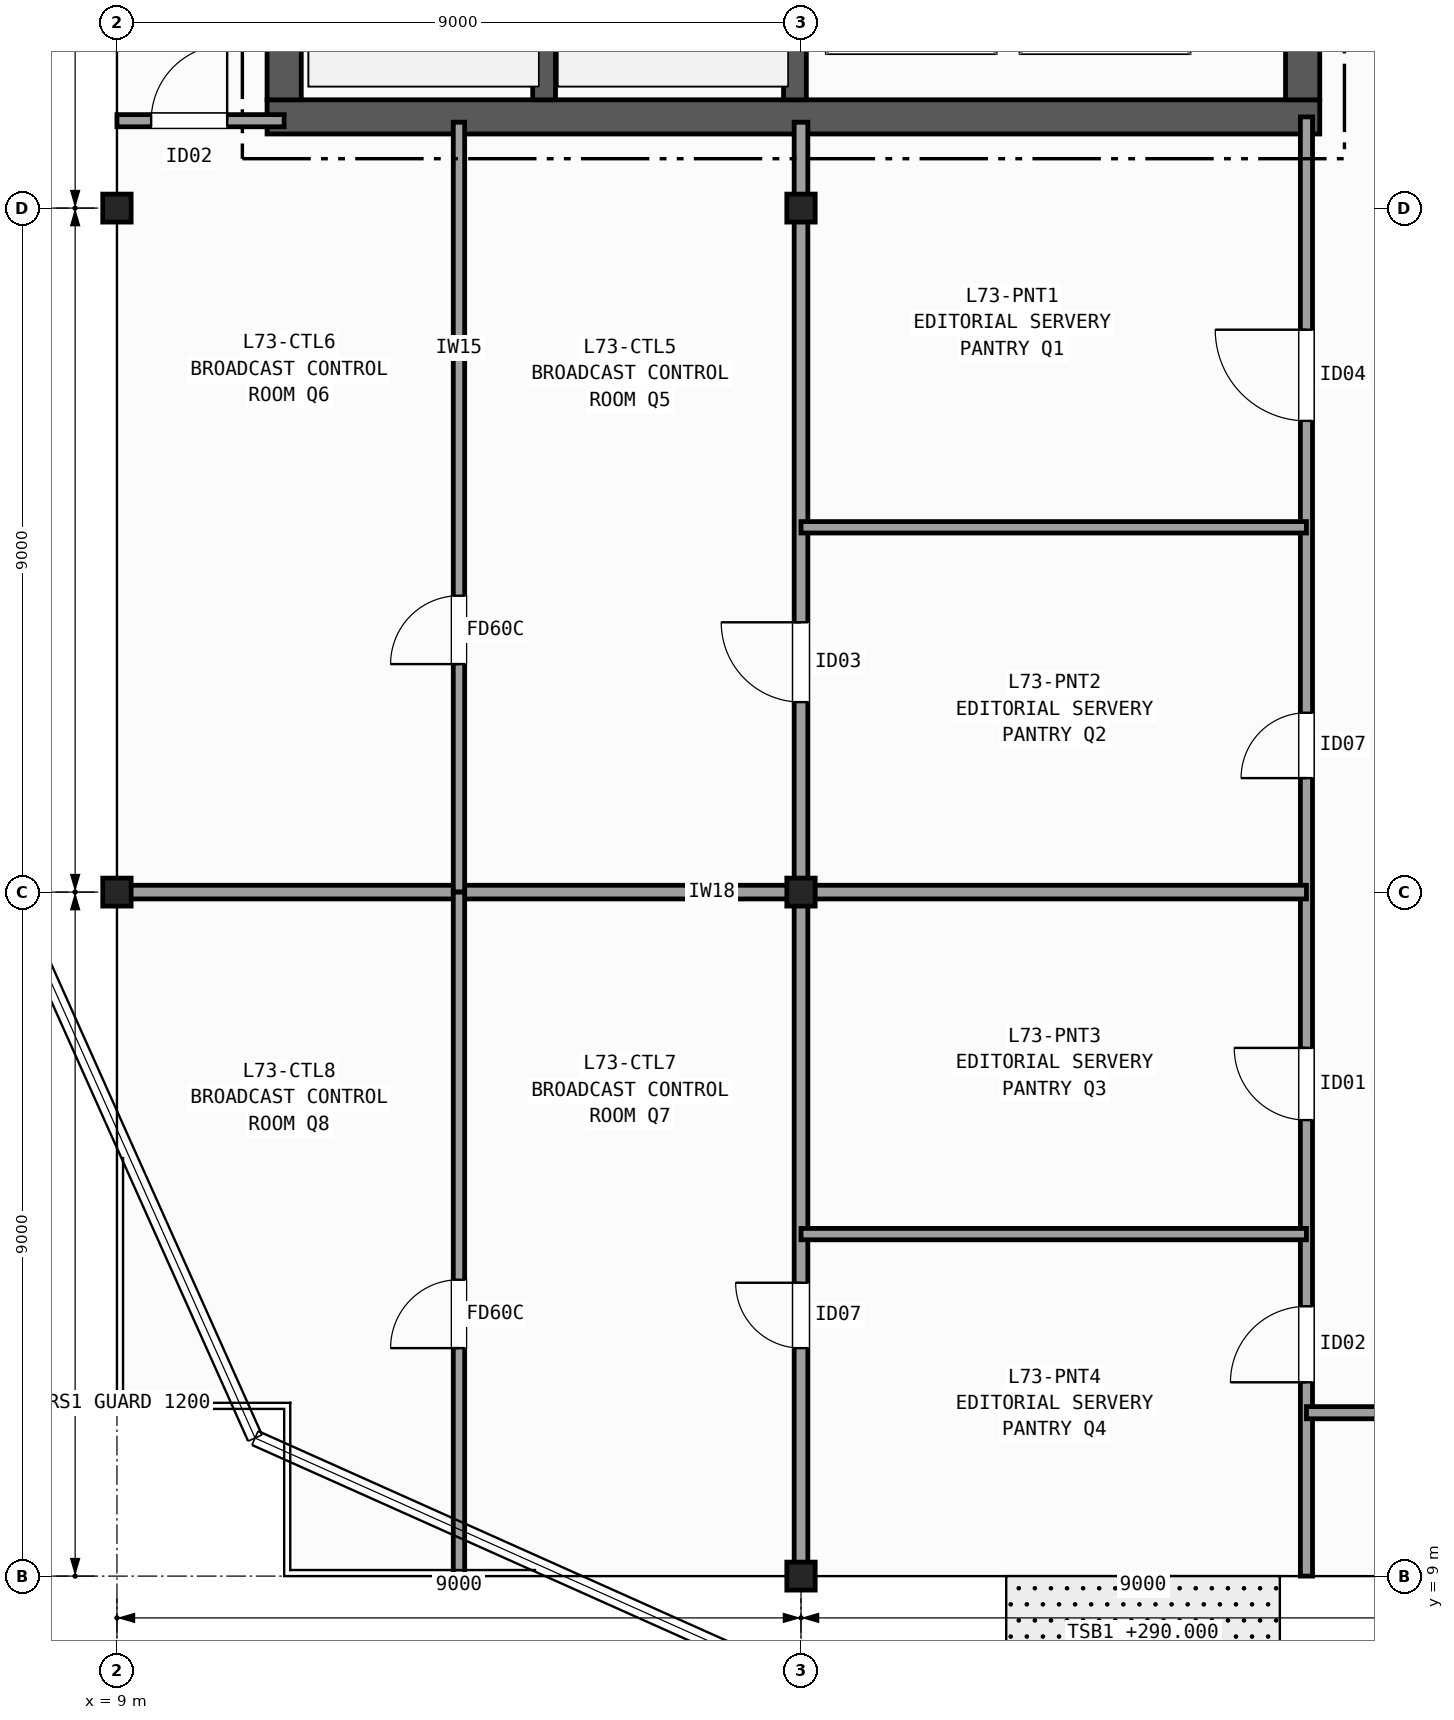
"""IFC4 building model, lengths in metres.
Left out: names, types, materials, properties, quantities, classifications, styles, units other than length and angle.
Written with IfcOpenShell. Run it as: python <this file> out.ifc"""

import sys

from ifc_helpers import new_model, si_unit, direction, frame, frame_2d, origin, origin_2d, place, context, subcontext, project, spatial, rectangle, i_section, extrude, element, fill, save


model = new_model("IFC4")
c1 = context("Model", 3, precision=1e-05, world=origin(), true_north=direction((0.0, 1.0)))
c2 = subcontext(c1, "Body", "Model", "MODEL_VIEW")
j1 = project(units=[si_unit("LENGTHUNIT", "METRE"), si_unit("PLANEANGLEUNIT", "RADIAN")], contexts=[c1])
p1 = place(None, origin())
s1 = spatial("IfcSite", under=j1, at=p1, CompositionType="ELEMENT")
p2 = place(p1, origin())
s2 = spatial("IfcBuilding", under=s1, at=p2, CompositionType="ELEMENT")
p3 = place(p2, frame((0.0, 0.0, 290.0)))
s3 = spatial("IfcBuildingStorey", under=s2, at=p3, CompositionType="ELEMENT", Elevation=290.0)
for number, where, z_axis, x_axis in (
    (1, (9.0, 18.0, 0.0), (0.0, 0.0, 1.0), (1.0, 0.0, 0.0)),
    (2, (9.0, 27.0, 0.0), (0.0, 0.0, 1.0), (1.0, 0.0, 0.0)),
    (3, (18.0, 9.0, 0.0), (0.0, 0.0, 1.0), (1.0, 0.0, 0.0)),
    (4, (18.0, 18.0, 0.0), (0.0, 0.0, 1.0), (1.0, 0.0, 0.0)),
    (5, (18.0, 27.0, 0.0), (0.0, 0.0, 1.0), (1.0, 0.0, 0.0)),
):
    element("IfcColumn", number, at=place(p3, frame(where, z_axis=z_axis, x_axis=x_axis)), inside=s3, PredefinedType="COLUMN", context=c2, shape_type="SweptSolid", body=[
        extrude(i_section(OverallWidth=0.373, OverallDepth=0.368, WebThickness=0.015, FlangeThickness=0.024, FilletRadius=0.015, at=origin_2d()), origin(), (0.0, 0.0, 1.0), 3.7),
    ])
p4 = place(p3, frame((10.975, 28.2, 0.0), z_axis=(0.0, 0.0, 1.0), x_axis=(1.0, 0.0, 0.0)))
e6 = element("IfcWall", 6, at=p4, inside=s3, PredefinedType="SHEAR", context=c2, shape_type="SweptSolid", body=[
    extrude(rectangle(XDim=13.85, YDim=0.45, at=frame_2d((6.925, 0.0))), origin(), (0.0, 0.0, 1.0), 3.42),
])
p5 = place(p3, frame((11.2, 42.175, 0.0), z_axis=(0.0, 0.0, 1.0), x_axis=(0.0, -1.0, 0.0)))
e7 = element("IfcWall", 7, at=p5, inside=s3, PredefinedType="SHEAR", context=c2, shape_type="SweptSolid", body=[
    extrude(rectangle(XDim=13.75, YDim=0.45, at=frame_2d((6.875, 0.0))), origin(), (0.0, 0.0, 1.0), 3.42),
])
p6 = place(p3, frame((24.6, 28.425, 0.0), z_axis=(0.0, 0.0, 1.0), x_axis=(0.0, 1.0, 0.0)))
e8 = element("IfcWall", 8, at=p6, inside=s3, PredefinedType="SHEAR", context=c2, shape_type="SweptSolid", body=[
    extrude(rectangle(XDim=13.75, YDim=0.45, at=frame_2d((6.875, 0.0))), origin(), (0.0, 0.0, 1.0), 3.42),
])
p7 = place(p6, frame((3.375, 0.0, 0.0)))
e9 = element("IfcOpeningElement", 9, at=p7, cuts=e8, PredefinedType="OPENING", context=c2, shape_type="SweptSolid", body=[
    extrude(rectangle(XDim=1.5, YDim=2.2, at=frame_2d((0.75, 1.1))), frame((0.0, 0.235, 0.0), z_axis=(0.0, -1.0, 0.0), x_axis=(1.0, 0.0, 0.0)), (0.0, 0.0, 1.0), 0.47),
])
p8 = place(p6, frame((9.975, 0.0, 0.0)))
e10 = element("IfcOpeningElement", 10, at=p8, cuts=e8, PredefinedType="OPENING", context=c2, shape_type="SweptSolid", body=[
    extrude(rectangle(XDim=0.9, YDim=2.1, at=frame_2d((0.45, 1.05))), frame((0.0, 0.235, 0.0), z_axis=(0.0, -1.0, 0.0), x_axis=(1.0, 0.0, 0.0)), (0.0, 0.0, 1.0), 0.47),
])
p9 = place(p3, frame((14.62, 28.425, 0.0), z_axis=(0.0, 0.0, 1.0), x_axis=(0.0, 1.0, 0.0)))
e11 = element("IfcWall", 11, at=p9, inside=s3, PredefinedType="SHEAR", context=c2, shape_type="SweptSolid", body=[
    extrude(rectangle(XDim=9.025, YDim=0.3, at=frame_2d((4.512, 0.0))), origin(), (0.0, 0.0, 1.0), 3.42),
])
p10 = place(p3, frame((17.92, 42.175, 0.0), z_axis=(0.0, 0.0, 1.0), x_axis=(0.0, -1.0, 0.0)))
e12 = element("IfcWall", 12, at=p10, inside=s3, PredefinedType="SHEAR", context=c2, shape_type="SweptSolid", body=[
    extrude(rectangle(XDim=13.75, YDim=0.3, at=frame_2d((6.875, 0.0))), origin(), (0.0, 0.0, 1.0), 3.42),
])
p11 = place(p10, frame((2.0, 0.0, 0.0)))
e13 = element("IfcOpeningElement", 13, at=p11, cuts=e12, PredefinedType="OPENING", context=c2, shape_type="SweptSolid", body=[
    extrude(rectangle(XDim=1.15, YDim=2.15, at=frame_2d((0.575, 1.075))), frame((0.0, 0.16, 0.0), z_axis=(0.0, -1.0, 0.0), x_axis=(1.0, 0.0, 0.0)), (0.0, 0.0, 1.0), 0.32),
])
p12 = place(p3, frame((9.0, 28.15, 0.0), z_axis=(0.0, 0.0, 1.0), x_axis=(1.0, 0.0, 0.0)))
e14 = element("IfcWall", 14, at=p12, inside=s3, PredefinedType="PARTITIONING", context=c2, shape_type="SweptSolid", body=[
    extrude(rectangle(XDim=2.2, YDim=0.16, at=frame_2d((1.1, 0.0))), origin(), (0.0, 0.0, 1.0), 2.707),
])
p13 = place(p12, frame((0.45, 0.0, 0.0)))
e15 = element("IfcOpeningElement", 15, at=p13, cuts=e14, PredefinedType="OPENING", context=c2, shape_type="SweptSolid", body=[
    extrude(rectangle(XDim=1.0, YDim=2.1, at=frame_2d((0.5, 1.05))), frame((0.0, 0.09, 0.0), z_axis=(0.0, -1.0, 0.0), x_axis=(1.0, 0.0, 0.0)), (0.0, 0.0, 1.0), 0.18),
])
p14 = place(p3, frame((24.65, 9.0, 0.0), z_axis=(0.0, 0.0, 1.0), x_axis=(0.0, 1.0, 0.0)))
e16 = element("IfcWall", 16, at=p14, inside=s3, PredefinedType="PARTITIONING", context=c2, shape_type="SweptSolid", body=[
    extrude(rectangle(XDim=19.2, YDim=0.16, at=frame_2d((9.6, 0.0))), origin(), (0.0, 0.0, 1.0), 2.707),
])
p15 = place(p14, frame((15.2, 0.0, 0.0)))
e17 = element("IfcOpeningElement", 17, at=p15, cuts=e16, PredefinedType="OPENING", context=c2, shape_type="SweptSolid", body=[
    extrude(rectangle(XDim=1.2, YDim=2.15, at=frame_2d((0.6, 1.075))), frame((0.0, 0.09, 0.0), z_axis=(0.0, -1.0, 0.0), x_axis=(1.0, 0.0, 0.0)), (0.0, 0.0, 1.0), 0.18),
])
p16 = place(p14, frame((10.5, 0.0, 0.0)))
e18 = element("IfcOpeningElement", 18, at=p16, cuts=e16, PredefinedType="OPENING", context=c2, shape_type="SweptSolid", body=[
    extrude(rectangle(XDim=0.86, YDim=2.05, at=frame_2d((0.43, 1.025))), frame((0.0, 0.09, 0.0), z_axis=(0.0, -1.0, 0.0), x_axis=(1.0, 0.0, 0.0)), (0.0, 0.0, 1.0), 0.18),
])
p17 = place(p14, frame((6.0, 0.0, 0.0)))
e19 = element("IfcOpeningElement", 19, at=p17, cuts=e16, PredefinedType="OPENING", context=c2, shape_type="SweptSolid", body=[
    extrude(rectangle(XDim=0.95, YDim=2.1, at=frame_2d((0.475, 1.05))), frame((0.0, 0.09, 0.0), z_axis=(0.0, -1.0, 0.0), x_axis=(1.0, 0.0, 0.0)), (0.0, 0.0, 1.0), 0.18),
])
p18 = place(p14, frame((2.55, 0.0, 0.0)))
e20 = element("IfcOpeningElement", 20, at=p18, cuts=e16, PredefinedType="OPENING", context=c2, shape_type="SweptSolid", body=[
    extrude(rectangle(XDim=1.0, YDim=2.1, at=frame_2d((0.5, 1.05))), frame((0.0, 0.09, 0.0), z_axis=(0.0, -1.0, 0.0), x_axis=(1.0, 0.0, 0.0)), (0.0, 0.0, 1.0), 0.18),
])
p19 = place(p3, frame((9.0, 18.0, 0.0), z_axis=(0.0, 0.0, 1.0), x_axis=(1.0, 0.0, 0.0)))
e21 = element("IfcWall", 21, at=p19, inside=s3, PredefinedType="PARTITIONING", context=c2, shape_type="SweptSolid", body=[
    extrude(rectangle(XDim=15.65, YDim=0.18, at=frame_2d((7.825, 0.0))), origin(), (0.0, 0.0, 1.0), 2.707),
])
p20 = place(p3, frame((18.0, 9.0, 0.0), z_axis=(0.0, 0.0, 1.0), x_axis=(0.0, 1.0, 0.0)))
e22 = element("IfcWall", 22, at=p20, inside=s3, PredefinedType="PARTITIONING", context=c2, shape_type="SweptSolid", body=[
    extrude(rectangle(XDim=19.13, YDim=0.18, at=frame_2d((9.565, 0.0))), origin(), (0.0, 0.0, 1.0), 2.707),
])
p21 = place(p20, frame((11.5, 0.0, 0.0)))
e23 = element("IfcOpeningElement", 23, at=p21, cuts=e22, PredefinedType="OPENING", context=c2, shape_type="SweptSolid", body=[
    extrude(rectangle(XDim=1.05, YDim=2.15, at=frame_2d((0.525, 1.075))), frame((0.0, 0.1, 0.0), z_axis=(0.0, -1.0, 0.0), x_axis=(1.0, 0.0, 0.0)), (0.0, 0.0, 1.0), 0.2),
])
p22 = place(p20, frame((3.0, 0.0, 0.0)))
e24 = element("IfcOpeningElement", 24, at=p22, cuts=e22, PredefinedType="OPENING", context=c2, shape_type="SweptSolid", body=[
    extrude(rectangle(XDim=0.86, YDim=2.05, at=frame_2d((0.43, 1.025))), frame((0.0, 0.1, 0.0), z_axis=(0.0, -1.0, 0.0), x_axis=(1.0, 0.0, 0.0)), (0.0, 0.0, 1.0), 0.2),
])
p23 = place(p3, frame((13.5, 18.0, 0.0), z_axis=(0.0, 0.0, 1.0), x_axis=(0.0, 1.0, 0.0)))
e25 = element("IfcWall", 25, at=p23, inside=s3, PredefinedType="PARTITIONING", context=c2, shape_type="SweptSolid", body=[
    extrude(rectangle(XDim=10.13, YDim=0.15, at=frame_2d((5.065, 0.0))), origin(), (0.0, 0.0, 1.0), 2.789),
])
p24 = place(p23, frame((3.0, 0.0, 0.0)))
e26 = element("IfcOpeningElement", 26, at=p24, cuts=e25, PredefinedType="OPENING", context=c2, shape_type="SweptSolid", body=[
    extrude(rectangle(XDim=0.9, YDim=2.1, at=frame_2d((0.45, 1.05))), frame((0.0, 0.085, 0.0), z_axis=(0.0, -1.0, 0.0), x_axis=(1.0, 0.0, 0.0)), (0.0, 0.0, 1.0), 0.17),
])
p25 = place(p3, frame((13.5, 9.0, 0.0), z_axis=(0.0, 0.0, 1.0), x_axis=(0.0, 1.0, 0.0)))
e27 = element("IfcWall", 27, at=p25, inside=s3, PredefinedType="PARTITIONING", context=c2, shape_type="SweptSolid", body=[
    extrude(rectangle(XDim=9.0, YDim=0.15, at=frame_2d((4.5, 0.0))), origin(), (0.0, 0.0, 1.0), 2.789),
])
p26 = place(p25, frame((3.0, 0.0, 0.0)))
e28 = element("IfcOpeningElement", 28, at=p26, cuts=e27, PredefinedType="OPENING", context=c2, shape_type="SweptSolid", body=[
    extrude(rectangle(XDim=0.9, YDim=2.1, at=frame_2d((0.45, 1.05))), frame((0.0, 0.085, 0.0), z_axis=(0.0, -1.0, 0.0), x_axis=(1.0, 0.0, 0.0)), (0.0, 0.0, 1.0), 0.17),
])
for number, where, z_axis, x_axis in (
    (29, (18.0, 22.8, 0.0), (0.0, 0.0, 1.0), (1.0, 0.0, 0.0)),
    (30, (18.0, 13.5, 0.0), (0.0, 0.0, 1.0), (1.0, 0.0, 0.0)),
):
    element("IfcWall", number, at=place(p3, frame(where, z_axis=z_axis, x_axis=x_axis)), inside=s3, PredefinedType="PARTITIONING", context=c2, shape_type="SweptSolid", body=[
        extrude(rectangle(XDim=6.65, YDim=0.15, at=frame_2d((3.325, 0.0))), origin(), (0.0, 0.0, 1.0), 2.792),
    ])
p27 = place(p3, frame((24.65, 11.15, 0.0), z_axis=(0.0, 0.0, 1.0), x_axis=(1.0, 0.0, 0.0)))
e31 = element("IfcWall", 31, at=p27, inside=s3, PredefinedType="PARTITIONING", context=c2, shape_type="SweptSolid", body=[
    extrude(rectangle(XDim=4.75, YDim=0.16, at=frame_2d((2.375, 0.0))), origin(), (0.0, 0.0, 1.0), 2.792),
])
p28 = place(p27, frame((1.2, 0.0, 0.0)))
e32 = element("IfcOpeningElement", 32, at=p28, cuts=e31, PredefinedType="OPENING", context=c2, shape_type="SweptSolid", body=[
    extrude(rectangle(XDim=1.0, YDim=2.1, at=frame_2d((0.5, 1.05))), frame((0.0, 0.09, 0.0), z_axis=(0.0, -1.0, 0.0), x_axis=(1.0, 0.0, 0.0)), (0.0, 0.0, 1.0), 0.18),
])
p29 = place(p13, origin())
e33 = element("IfcDoor", 33, at=p29, inside=s3, OperationType="SINGLE_SWING_RIGHT", PredefinedType="DOOR", context=c2, shape_type="SweptSolid", body=[
    extrude(rectangle(XDim=1.0, YDim=2.1, at=frame_2d((0.5, 1.05))), frame((0.0, 0.025, 0.0), z_axis=(0.0, -1.0, 0.0), x_axis=(1.0, 0.0, 0.0)), (0.0, 0.0, 1.0), 0.05),
])
fill(e15, e33)
p30 = place(p15, origin())
e34 = element("IfcDoor", 34, at=p30, inside=s3, OperationType="SINGLE_SWING_RIGHT", PredefinedType="DOOR", context=c2, shape_type="SweptSolid", body=[
    extrude(rectangle(XDim=1.2, YDim=2.15, at=frame_2d((0.6, 1.075))), frame((0.0, 0.025, 0.0), z_axis=(0.0, -1.0, 0.0), x_axis=(1.0, 0.0, 0.0)), (0.0, 0.0, 1.0), 0.05),
])
fill(e17, e34)
p31 = place(p16, origin())
e35 = element("IfcDoor", 35, at=p31, inside=s3, OperationType="SINGLE_SWING_LEFT", PredefinedType="DOOR", context=c2, shape_type="SweptSolid", body=[
    extrude(rectangle(XDim=0.86, YDim=2.05, at=frame_2d((0.43, 1.025))), frame((0.0, 0.025, 0.0), z_axis=(0.0, -1.0, 0.0), x_axis=(1.0, 0.0, 0.0)), (0.0, 0.0, 1.0), 0.05),
])
fill(e18, e35)
p32 = place(p17, origin())
e36 = element("IfcDoor", 36, at=p32, inside=s3, OperationType="SINGLE_SWING_RIGHT", PredefinedType="DOOR", context=c2, shape_type="SweptSolid", body=[
    extrude(rectangle(XDim=0.95, YDim=2.1, at=frame_2d((0.475, 1.05))), frame((0.0, 0.025, 0.0), z_axis=(0.0, -1.0, 0.0), x_axis=(1.0, 0.0, 0.0)), (0.0, 0.0, 1.0), 0.05),
])
fill(e19, e36)
p33 = place(p18, origin())
e37 = element("IfcDoor", 37, at=p33, inside=s3, OperationType="SINGLE_SWING_LEFT", PredefinedType="DOOR", context=c2, shape_type="SweptSolid", body=[
    extrude(rectangle(XDim=1.0, YDim=2.1, at=frame_2d((0.5, 1.05))), frame((0.0, 0.025, 0.0), z_axis=(0.0, -1.0, 0.0), x_axis=(1.0, 0.0, 0.0)), (0.0, 0.0, 1.0), 0.05),
])
fill(e20, e37)
p34 = place(p21, origin())
e38 = element("IfcDoor", 38, at=p34, inside=s3, OperationType="SINGLE_SWING_RIGHT", PredefinedType="DOOR", context=c2, shape_type="SweptSolid", body=[
    extrude(rectangle(XDim=1.05, YDim=2.15, at=frame_2d((0.525, 1.075))), frame((0.0, 0.025, 0.0), z_axis=(0.0, -1.0, 0.0), x_axis=(1.0, 0.0, 0.0)), (0.0, 0.0, 1.0), 0.05),
])
fill(e23, e38)
p35 = place(p24, origin())
e39 = element("IfcDoor", 39, at=p35, inside=s3, OperationType="SINGLE_SWING_LEFT", PredefinedType="DOOR", context=c2, shape_type="SweptSolid", body=[
    extrude(rectangle(XDim=0.9, YDim=2.1, at=frame_2d((0.45, 1.05))), frame((0.0, 0.025, 0.0), z_axis=(0.0, -1.0, 0.0), x_axis=(1.0, 0.0, 0.0)), (0.0, 0.0, 1.0), 0.05),
])
fill(e26, e39)
p36 = place(p22, origin())
e40 = element("IfcDoor", 40, at=p36, inside=s3, OperationType="SINGLE_SWING_RIGHT", PredefinedType="DOOR", context=c2, shape_type="SweptSolid", body=[
    extrude(rectangle(XDim=0.86, YDim=2.05, at=frame_2d((0.43, 1.025))), frame((0.0, 0.025, 0.0), z_axis=(0.0, -1.0, 0.0), x_axis=(1.0, 0.0, 0.0)), (0.0, 0.0, 1.0), 0.05),
])
fill(e24, e40)
p37 = place(p26, origin())
e41 = element("IfcDoor", 41, at=p37, inside=s3, OperationType="SINGLE_SWING_LEFT", PredefinedType="DOOR", context=c2, shape_type="SweptSolid", body=[
    extrude(rectangle(XDim=0.9, YDim=2.1, at=frame_2d((0.45, 1.05))), frame((0.0, 0.025, 0.0), z_axis=(0.0, -1.0, 0.0), x_axis=(1.0, 0.0, 0.0)), (0.0, 0.0, 1.0), 0.05),
])
fill(e28, e41)
save(model, sys.argv[1])
